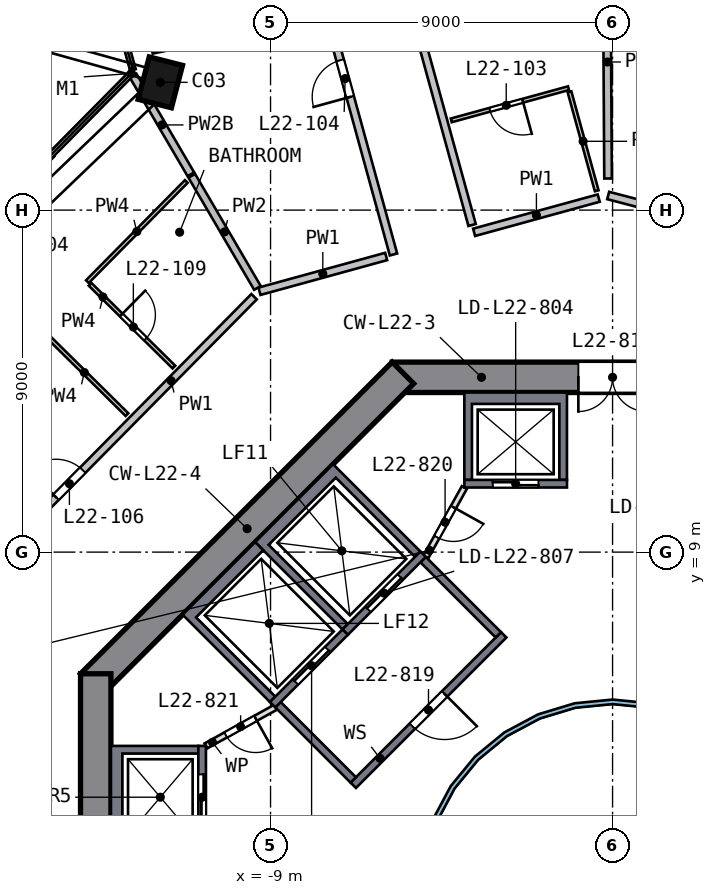
"""IFC4 building model, lengths in metres.
Left out: names, types, materials, properties, quantities, classifications, styles, units other than length and angle.
Written with IfcOpenShell. Run it as: python <this file> out.ifc"""

import sys

from ifc_helpers import new_model, si_unit, direction, frame, frame_2d, origin, origin_2d, place, context, subcontext, project, spatial, polyline, rectangle, outline, extrude, element, fill, save


model = new_model("IFC4")
c1 = context("Model", 3, precision=1e-05, world=origin(), true_north=direction((0.0, 1.0)))
c2 = subcontext(c1, "Body", "Model", "MODEL_VIEW")
j1 = project(units=[si_unit("LENGTHUNIT", "METRE"), si_unit("PLANEANGLEUNIT", "RADIAN")], contexts=[c1])
p1 = place(None, origin())
s1 = spatial("IfcSite", under=j1, at=p1, CompositionType="ELEMENT")
p2 = place(p1, origin())
s2 = spatial("IfcBuilding", under=s1, at=p2, CompositionType="ELEMENT")
p3 = place(p2, frame((0.0, 0.0, 96.5)))
s3 = spatial("IfcBuildingStorey", under=s2, at=p3, CompositionType="ELEMENT", Elevation=96.5)
p4 = place(p3, frame((-11.777, 21.431, 0.0), z_axis=(-0.10140473, -0.056859624, 0.993219041), x_axis=(0.245212496, 0.966134351, 0.080344556)))
e1 = element("IfcColumn", 1, at=p4, inside=s3, PredefinedType="COLUMN", context=c2, shape_type="SweptSolid", body=[
    extrude(rectangle(XDim=1.15, YDim=0.9, at=origin_2d()), origin(), (0.0, 0.0, 1.0), 3.212),
])
p5 = place(p3, frame((5.799, 13.6, 0.0), z_axis=(0.0, 0.0, 1.0), x_axis=(-1.0, 0.0, 0.0)))
e2 = element("IfcWall", 2, at=p5, inside=s3, PredefinedType="SHEAR", context=c2, shape_type="SweptSolid", body=[
    extrude(rectangle(XDim=11.598, YDim=0.8, at=frame_2d((5.799, 0.0))), origin(), (0.0, 0.0, 1.0), 3.5),
])
p6 = place(p5, frame((4.899, 0.0, 0.0)))
e3 = element("IfcOpeningElement", 3, at=p6, cuts=e2, PredefinedType="OPENING", context=c2, shape_type="SweptSolid", body=[
    extrude(rectangle(XDim=1.8, YDim=2.1, at=frame_2d((0.9, 1.05))), frame((0.0, 0.41, 0.0), z_axis=(0.0, -1.0, 0.0), x_axis=(1.0, 0.0, 0.0)), (0.0, 0.0, 1.0), 0.82),
])
p7 = place(p3, frame((-5.516, 13.717, 0.0), z_axis=(0.0, 0.0, 1.0), x_axis=(-0.707106781, -0.707106781, 0.0)))
e4 = element("IfcWall", 4, at=p7, inside=s3, PredefinedType="SHEAR", context=c2, shape_type="SweptSolid", body=[
    extrude(rectangle(XDim=11.598, YDim=0.8, at=frame_2d((5.799, 0.0))), origin(), (0.0, 0.0, 1.0), 3.5),
])
p8 = place(p3, frame((-13.6, 5.799, 0.0), z_axis=(0.0, 0.0, 1.0), x_axis=(0.0, -1.0, 0.0)))
e5 = element("IfcWall", 5, at=p8, inside=s3, PredefinedType="SHEAR", context=c2, shape_type="SweptSolid", body=[
    extrude(rectangle(XDim=11.598, YDim=0.8, at=frame_2d((5.799, 0.0))), origin(), (0.0, 0.0, 1.0), 3.5),
])
p9 = place(p8, frame((4.899, 0.0, 0.0)))
e6 = element("IfcOpeningElement", 6, at=p9, cuts=e5, PredefinedType="OPENING", context=c2, shape_type="SweptSolid", body=[
    extrude(rectangle(XDim=1.8, YDim=2.1, at=frame_2d((0.9, 1.05))), frame((0.0, 0.41, 0.0), z_axis=(0.0, -1.0, 0.0), x_axis=(1.0, 0.0, 0.0)), (0.0, 0.0, 1.0), 0.82),
])
p10 = place(p3, frame((-14.766, 19.465, 0.0), z_axis=(0.0, 0.0, 1.0), x_axis=(-0.702631444, -0.711553971, 0.0)))
e7 = element("IfcWall", 7, at=p10, inside=s3, PredefinedType="SOLIDWALL", context=c2, shape_type="SweptSolid", body=[
    extrude(rectangle(XDim=3.475, YDim=0.15, at=frame_2d((1.738, 0.0))), origin(), (0.0, 0.0, 1.0), 2.425),
])
p11 = place(p10, frame((0.4, 0.0, 0.0)))
e8 = element("IfcOpeningElement", 8, at=p11, cuts=e7, PredefinedType="OPENING", context=c2, shape_type="SweptSolid", body=[
    extrude(rectangle(XDim=2.4, YDim=2.4, at=frame_2d((1.2, 1.2))), frame((0.0, 0.085, 0.0), z_axis=(0.0, -1.0, 0.0), x_axis=(1.0, 0.0, 0.0)), (0.0, 0.0, 1.0), 0.17),
])
p12 = place(p3, origin())
e9 = element("IfcWall", 9, at=p12, inside=s3, PredefinedType="SOLIDWALL", context=c2, shape_type="SweptSolid", body=[
    extrude(outline(polyline([(-3.9, 10.9), (-3.9, 13.2), (-1.2, 13.2), (-1.2, 10.9), (-1.4, 10.9), (-1.4, 12.9), (-3.7, 12.9), (-3.7, 10.9), (-3.9, 10.9)])), origin(), (0.0, 0.0, 1.0), 3.19),
])
p13 = place(p3, frame((-1.2, 10.8, 0.0), z_axis=(0.0, 0.0, 1.0), x_axis=(-1.0, 0.0, 0.0)))
e10 = element("IfcWall", 10, at=p13, inside=s3, PredefinedType="SOLIDWALL", context=c2, shape_type="SweptSolid", body=[
    extrude(rectangle(XDim=2.7, YDim=0.2, at=frame_2d((1.35, 0.0))), origin(), (0.0, 0.0, 1.0), 3.19),
])
p14 = place(p13, frame((0.75, 0.0, 0.0)))
e11 = element("IfcOpeningElement", 11, at=p14, cuts=e10, PredefinedType="OPENING", context=c2, shape_type="SweptSolid", body=[
    extrude(rectangle(XDim=1.2, YDim=2.1, at=frame_2d((0.6, 1.05))), frame((0.0, 0.11, 0.0), z_axis=(0.0, -1.0, 0.0), x_axis=(1.0, 0.0, 0.0)), (0.0, 0.0, 1.0), 0.22),
])
p15 = place(p3, origin())
e12 = element("IfcWall", 12, at=p15, inside=s3, PredefinedType="SOLIDWALL", context=c2, shape_type="SweptSolid", body=[
    extrude(outline(polyline([(-13.2, 3.9), (-10.9, 3.9), (-10.9, 3.7), (-12.9, 3.7), (-12.9, 1.4), (-10.9, 1.4), (-10.9, 1.2), (-13.2, 1.2), (-13.2, 3.9)])), origin(), (0.0, 0.0, 1.0), 3.19),
])
p16 = place(p3, frame((-10.8, 1.2, 0.0), z_axis=(0.0, 0.0, 1.0), x_axis=(0.0, 1.0, 0.0)))
e13 = element("IfcWall", 13, at=p16, inside=s3, PredefinedType="SOLIDWALL", context=c2, shape_type="SweptSolid", body=[
    extrude(rectangle(XDim=2.7, YDim=0.2, at=frame_2d((1.35, 0.0))), origin(), (0.0, 0.0, 1.0), 3.19),
])
p17 = place(p16, frame((0.75, 0.0, 0.0)))
e14 = element("IfcOpeningElement", 14, at=p17, cuts=e13, PredefinedType="OPENING", context=c2, shape_type="SweptSolid", body=[
    extrude(rectangle(XDim=1.2, YDim=2.1, at=frame_2d((0.6, 1.05))), frame((0.0, 0.11, 0.0), z_axis=(0.0, -1.0, 0.0), x_axis=(1.0, 0.0, 0.0)), (0.0, 0.0, 1.0), 0.22),
])
p18 = place(p3, origin())
e15 = element("IfcWall", 15, at=p18, inside=s3, PredefinedType="SOLIDWALL", context=c2, shape_type="SweptSolid", body=[
    extrude(outline(polyline([(-9.405, 9.263), (-7.354, 11.314), (-5.056, 9.016), (-5.197, 8.874), (-7.283, 10.96), (-9.051, 9.192), (-6.965, 7.106), (-7.106, 6.965), (-9.405, 9.263)])), origin(), (0.0, 0.0, 1.0), 3.19),
])
p19 = place(p3, frame((-4.985, 8.945, 0.0), z_axis=(0.0, 0.0, 1.0), x_axis=(-0.707106781, -0.707106781, 0.0)))
e16 = element("IfcWall", 16, at=p19, inside=s3, PredefinedType="SOLIDWALL", context=c2, shape_type="SweptSolid", body=[
    extrude(rectangle(XDim=2.9, YDim=0.2, at=frame_2d((1.45, 0.0))), origin(), (0.0, 0.0, 1.0), 3.19),
])
p20 = place(p19, frame((0.85, 0.0, 0.0)))
e17 = element("IfcOpeningElement", 17, at=p20, cuts=e16, PredefinedType="OPENING", context=c2, shape_type="SweptSolid", body=[
    extrude(rectangle(XDim=1.2, YDim=2.1, at=frame_2d((0.6, 1.05))), frame((0.0, 0.11, 0.0), z_axis=(0.0, -1.0, 0.0), x_axis=(1.0, 0.0, 0.0)), (0.0, 0.0, 1.0), 0.22),
])
p21 = place(p3, origin())
e18 = element("IfcWall", 18, at=p21, inside=s3, PredefinedType="SOLIDWALL", context=c2, shape_type="SweptSolid", body=[
    extrude(outline(polyline([(-11.314, 7.354), (-9.405, 9.263), (-9.192, 9.051), (-10.96, 7.283), (-8.874, 5.197), (-9.016, 5.056), (-11.314, 7.354)])), origin(), (0.0, 0.0, 1.0), 3.19),
])
p22 = place(p3, frame((-7.036, 6.894, 0.0), z_axis=(0.0, 0.0, 1.0), x_axis=(-0.707106781, -0.707106781, 0.0)))
e19 = element("IfcWall", 19, at=p22, inside=s3, PredefinedType="SOLIDWALL", context=c2, shape_type="SweptSolid", body=[
    extrude(rectangle(XDim=2.7, YDim=0.2, at=frame_2d((1.35, 0.0))), origin(), (0.0, 0.0, 1.0), 3.19),
])
p23 = place(p22, frame((0.65, 0.0, 0.0)))
e20 = element("IfcOpeningElement", 20, at=p23, cuts=e19, PredefinedType="OPENING", context=c2, shape_type="SweptSolid", body=[
    extrude(rectangle(XDim=1.2, YDim=2.1, at=frame_2d((0.6, 1.05))), frame((0.0, 0.11, 0.0), z_axis=(0.0, -1.0, 0.0), x_axis=(1.0, 0.0, 0.0)), (0.0, 0.0, 1.0), 0.22),
])
p24 = place(p3, frame((-2.864, 6.823, 0.0), z_axis=(0.0, 0.0, 1.0), x_axis=(-0.707106781, -0.707106781, 0.0)))
e21 = element("IfcWall", 21, at=p24, inside=s3, PredefinedType="SOLIDWALL", context=c2, shape_type="SweptSolid", body=[
    extrude(rectangle(XDim=5.6, YDim=0.2, at=frame_2d((2.8, 0.0))), origin(), (0.0, 0.0, 1.0), 3.19),
])
p25 = place(p24, frame((2.2, 0.0, 0.0)))
e22 = element("IfcOpeningElement", 22, at=p25, cuts=e21, PredefinedType="OPENING", context=c2, shape_type="SweptSolid", body=[
    extrude(rectangle(XDim=1.2, YDim=2.1, at=frame_2d((0.6, 1.05))), frame((0.0, 0.11, 0.0), z_axis=(0.0, -1.0, 0.0), x_axis=(1.0, 0.0, 0.0)), (0.0, 0.0, 1.0), 0.22),
])
for number, where, z_axis, x_axis in (
    (23, (-3.005, 6.823, 0.0), (0.0, 0.0, 1.0), (-0.707, 0.707, 0.0)),
    (24, (-6.823, 3.005, 0.0), (0.0, 0.0, 1.0), (-0.707, 0.707, 0.0)),
):
    element("IfcWall", number, at=place(p3, frame(where, z_axis=z_axis, x_axis=x_axis)), inside=s3, PredefinedType="SOLIDWALL", context=c2, shape_type="SweptSolid", body=[
        extrude(rectangle(XDim=2.8, YDim=0.2, at=frame_2d((1.4, 0.0))), origin(), (0.0, 0.0, 1.0), 3.19),
    ])
p26 = place(p3, frame((-3.9, 10.7, 0.0), z_axis=(0.0, 0.0, 1.0), x_axis=(-0.485692555, -0.874129705, 0.0)))
e25 = element("IfcWall", 25, at=p26, inside=s3, PredefinedType="PARTITIONING", context=c2, shape_type="SweptSolid", body=[
    extrude(rectangle(XDim=2.089, YDim=0.15, at=frame_2d((1.044, 0.0))), origin(), (0.0, 0.0, 1.0), 3.19),
])
p27 = place(p26, frame((0.594, 0.0, 0.0)))
e26 = element("IfcOpeningElement", 26, at=p27, cuts=e25, PredefinedType="OPENING", context=c2, shape_type="SweptSolid", body=[
    extrude(rectangle(XDim=0.9, YDim=2.1, at=frame_2d((0.45, 1.05))), frame((0.0, 0.085, 0.0), z_axis=(0.0, -1.0, 0.0), x_axis=(1.0, 0.0, 0.0)), (0.0, 0.0, 1.0), 0.17),
])
p28 = place(p3, frame((-8.874, 4.914, 0.0), z_axis=(0.0, 0.0, 1.0), x_axis=(-0.874129705, -0.485692555, 0.0)))
e27 = element("IfcWall", 27, at=p28, inside=s3, PredefinedType="PARTITIONING", context=c2, shape_type="SweptSolid", body=[
    extrude(rectangle(XDim=2.089, YDim=0.15, at=frame_2d((1.044, 0.0))), origin(), (0.0, 0.0, 1.0), 3.19),
])
p29 = place(p28, frame((0.594, 0.0, 0.0)))
e28 = element("IfcOpeningElement", 28, at=p29, cuts=e27, PredefinedType="OPENING", context=c2, shape_type="SweptSolid", body=[
    extrude(rectangle(XDim=0.9, YDim=2.1, at=frame_2d((0.45, 1.05))), frame((0.0, 0.085, 0.0), z_axis=(0.0, -1.0, 0.0), x_axis=(1.0, 0.0, 0.0)), (0.0, 0.0, 1.0), 0.17),
])
p30 = place(p3, origin())
e29 = element("IfcWall", 29, at=p30, inside=s3, PredefinedType="SOLIDWALL", context=c2, shape_type="SweptSolid", body=[
    extrude(outline(polyline([(5.021, -0.999), (4.73, -1.959), (4.257, -2.844), (3.62, -3.62), (2.844, -4.257), (1.959, -4.73), (0.999, -5.021), (0.0, -5.12), (-0.999, -5.021), (-1.959, -4.73), (-2.844, -4.257), (-3.62, -3.62), (-4.257, -2.844), (-4.73, -1.959), (-5.021, -0.999), (-5.12, 0.0), (-5.021, 0.999), (-4.73, 1.959), (-4.257, 2.844), (-3.62, 3.62), (-2.844, 4.257), (-1.959, 4.73), (-0.999, 5.021), (0.0, 5.12), (0.999, 5.021), (1.959, 4.73), (2.844, 4.257), (3.62, 3.62), (4.257, 2.844), (4.73, 1.959), (5.021, 0.999), (5.12, 0.0), (5.021, -0.999)]), holes=[polyline([(4.904, 0.976), (4.619, 1.913), (4.157, 2.778), (3.535, 3.535), (2.778, 4.157), (1.913, 4.619), (0.976, 4.904), (0.0, 5.0), (-0.976, 4.904), (-1.913, 4.619), (-2.778, 4.157), (-3.535, 3.535), (-4.157, 2.778), (-4.619, 1.913), (-4.904, 0.976), (-5.0, 0.0), (-4.904, -0.976), (-4.619, -1.913), (-4.157, -2.778), (-3.535, -3.535), (-2.778, -4.157), (-1.913, -4.619), (-0.976, -4.904), (0.0, -5.0), (0.976, -4.904), (1.913, -4.619), (2.778, -4.157), (3.535, -3.535), (4.157, -2.778), (4.619, -1.913), (4.904, -0.976), (5.0, 0.0), (4.904, 0.976)])]), origin(), (0.0, 0.0, 1.0), 3.19),
])
p31 = place(p3, frame((-15.979, 9.092, 0.0), z_axis=(0.0, 0.0, 1.0), x_axis=(0.702650979, 0.71153468, 0.0)))
e30 = element("IfcWall", 30, at=p31, inside=s3, PredefinedType="SOLIDWALL", context=c2, shape_type="SweptSolid", body=[
    extrude(rectangle(XDim=9.316, YDim=0.2, at=frame_2d((4.658, 0.0))), origin(), (0.0, 0.0, 1.0), 3.19),
])
p32 = place(p31, frame((1.9, 0.0, 0.0)))
e31 = element("IfcOpeningElement", 31, at=p32, cuts=e30, PredefinedType="OPENING", context=c2, shape_type="SweptSolid", body=[
    extrude(rectangle(XDim=1.0, YDim=2.1, at=frame_2d((0.5, 1.05))), frame((0.0, 0.11, 0.0), z_axis=(0.0, -1.0, 0.0), x_axis=(1.0, 0.0, 0.0)), (0.0, 0.0, 1.0), 0.22),
])
p33 = place(p3, frame((-5.958, 16.78, 0.0), z_axis=(0.0, 0.0, 1.0), x_axis=(-0.964263577, -0.264944813, 0.0)))
e32 = element("IfcWall", 32, at=p33, inside=s3, PredefinedType="SOLIDWALL", context=c2, shape_type="SweptSolid", body=[
    extrude(rectangle(XDim=3.458, YDim=0.2, at=frame_2d((1.729, 0.0))), origin(), (0.0, 0.0, 1.0), 3.19),
])
p34 = place(p3, frame((-5.765, 16.833, 0.0), z_axis=(0.0, 0.0, 1.0), x_axis=(-0.264881321, 0.96428102, 0.0)))
e33 = element("IfcWall", 33, at=p34, inside=s3, PredefinedType="SOLIDWALL", context=c2, shape_type="SweptSolid", body=[
    extrude(rectangle(XDim=12.271, YDim=0.2, at=frame_2d((6.135, 0.0))), origin(), (0.0, 0.0, 1.0), 3.19),
])
p35 = place(p34, frame((4.3, 0.0, 0.0)))
e34 = element("IfcOpeningElement", 34, at=p35, cuts=e33, PredefinedType="OPENING", context=c2, shape_type="SweptSolid", body=[
    extrude(rectangle(XDim=1.0, YDim=2.1, at=frame_2d((0.5, 1.05))), frame((0.0, 0.11, 0.0), z_axis=(0.0, -1.0, 0.0), x_axis=(1.0, 0.0, 0.0)), (0.0, 0.0, 1.0), 0.22),
])
p36 = place(p3, frame((-3.696, 17.608, 0.0), z_axis=(0.0, 0.0, 1.0), x_axis=(-0.264881463, 0.964280981, 0.0)))
e35 = element("IfcWall", 35, at=p36, inside=s3, PredefinedType="SOLIDWALL", context=c2, shape_type="SweptSolid", body=[
    extrude(rectangle(XDim=12.071, YDim=0.2, at=frame_2d((6.035, 0.0))), origin(), (0.0, 0.0, 1.0), 3.19),
])
p37 = place(p3, frame((-0.365, 18.316, 0.0), z_axis=(0.0, 0.0, 1.0), x_axis=(-0.964283368, -0.264872773, 0.0)))
e36 = element("IfcWall", 36, at=p37, inside=s3, PredefinedType="SOLIDWALL", context=c2, shape_type="SweptSolid", body=[
    extrude(rectangle(XDim=3.4, YDim=0.2, at=frame_2d((1.7, 0.0))), origin(), (0.0, 0.0, 1.0), 3.19),
])
p38 = place(p3, frame((9.092, 15.979, 0.0), z_axis=(0.0, 0.0, 1.0), x_axis=(-0.967528939, 0.252760265, 0.0)))
e37 = element("IfcWall", 37, at=p38, inside=s3, PredefinedType="SOLIDWALL", context=c2, shape_type="SweptSolid", body=[
    extrude(rectangle(XDim=9.516, YDim=0.2, at=frame_2d((4.758, 0.0))), origin(), (0.0, 0.0, 1.0), 3.19),
])
p39 = place(p3, frame((-11.096, 18.942, 0.0), z_axis=(0.0, 0.0, 1.0), x_axis=(-0.505382416, 0.862895482, 0.0)))
e38 = element("IfcWall", 38, at=p39, inside=s3, PredefinedType="SOLIDWALL", context=c2, shape_type="SweptSolid", body=[
    extrude(rectangle(XDim=3.011, YDim=0.2, at=frame_2d((1.506, 0.0))), origin(), (0.0, 0.0, 1.0), 2.69),
])
p40 = place(p3, frame((-9.344, 15.953, 0.0), z_axis=(0.0, 0.0, 1.0), x_axis=(-0.505424382, 0.862870903, 0.0)))
e39 = element("IfcWall", 39, at=p40, inside=s3, PredefinedType="SOLIDWALL", context=c2, shape_type="SweptSolid", body=[
    extrude(rectangle(XDim=3.418, YDim=0.2, at=frame_2d((1.709, 0.0))), origin(), (0.0, 0.0, 1.0), 3.19),
])
p41 = place(p3, frame((-0.157, 24.964, 0.0), z_axis=(0.0, 0.0, 1.0), x_axis=(0.006290436, -0.999980215, 0.0)))
e40 = element("IfcWall", 40, at=p41, inside=s3, PredefinedType="SOLIDWALL", context=c2, shape_type="SweptSolid", body=[
    extrude(rectangle(XDim=6.132, YDim=0.2, at=frame_2d((3.066, 0.0))), origin(), (0.0, 0.0, 1.0), 3.19),
])
p42 = place(p3, frame((-17.154, 16.94, 0.0), z_axis=(0.0, 0.0, 1.0), x_axis=(0.711519329, -0.702666525, 0.0)))
e41 = element("IfcWall", 41, at=p42, inside=s3, PredefinedType="PARTITIONING", context=c2, shape_type="SweptSolid", body=[
    extrude(rectangle(XDim=6.15, YDim=0.1, at=frame_2d((3.075, 0.0))), origin(), (0.0, 0.0, 1.0), 3.19),
])
p43 = place(p42, frame((1.8, 0.0, 0.0)))
e42 = element("IfcOpeningElement", 42, at=p43, cuts=e41, PredefinedType="OPENING", context=c2, shape_type="SweptSolid", body=[
    extrude(rectangle(XDim=1.0, YDim=2.1, at=frame_2d((0.5, 1.05))), frame((0.0, 0.06, 0.0), z_axis=(0.0, -1.0, 0.0), x_axis=(1.0, 0.0, 0.0)), (0.0, 0.0, 1.0), 0.12),
])
p44 = place(p3, frame((-13.748, 16.048, 0.0), z_axis=(0.0, 0.0, 1.0), x_axis=(0.711542382, -0.70264318, 0.0)))
e43 = element("IfcWall", 43, at=p44, inside=s3, PredefinedType="PARTITIONING", context=c2, shape_type="SweptSolid", body=[
    extrude(rectangle(XDim=3.1, YDim=0.1, at=frame_2d((1.55, 0.0))), origin(), (0.0, 0.0, 1.0), 3.19),
])
p45 = place(p44, frame((1.15, 0.0, 0.0)))
e44 = element("IfcOpeningElement", 44, at=p45, cuts=e43, PredefinedType="OPENING", context=c2, shape_type="SweptSolid", body=[
    extrude(rectangle(XDim=0.9, YDim=2.1, at=frame_2d((0.45, 1.05))), frame((0.0, 0.06, 0.0), z_axis=(0.0, -1.0, 0.0), x_axis=(1.0, 0.0, 0.0)), (0.0, 0.0, 1.0), 0.12),
])
p46 = place(p3, frame((-11.217, 18.753, 0.0), z_axis=(0.0, 0.0, 1.0), x_axis=(-0.702643586, -0.711541981, 0.0)))
e45 = element("IfcWall", 45, at=p46, inside=s3, PredefinedType="PARTITIONING", context=c2, shape_type="SweptSolid", body=[
    extrude(rectangle(XDim=3.704, YDim=0.1, at=frame_2d((1.852, 0.0))), origin(), (0.0, 0.0, 1.0), 3.19),
])
p47 = place(p3, frame((-1.159, 21.209, 0.0), z_axis=(0.0, 0.0, 1.0), x_axis=(-0.964283368, -0.264872773, 0.0)))
e46 = element("IfcWall", 46, at=p47, inside=s3, PredefinedType="PARTITIONING", context=c2, shape_type="SweptSolid", body=[
    extrude(rectangle(XDim=3.2, YDim=0.1, at=frame_2d((1.6, 0.0))), origin(), (0.0, 0.0, 1.0), 3.19),
])
p48 = place(p47, frame((1.25, 0.0, 0.0)))
e47 = element("IfcOpeningElement", 47, at=p48, cuts=e46, PredefinedType="OPENING", context=c2, shape_type="SweptSolid", body=[
    extrude(rectangle(XDim=0.9, YDim=2.1, at=frame_2d((0.45, 1.05))), frame((0.0, 0.06, 0.0), z_axis=(0.0, -1.0, 0.0), x_axis=(1.0, 0.0, 0.0)), (0.0, 0.0, 1.0), 0.12),
])
p49 = place(p3, frame((-0.417, 18.509, 0.0), z_axis=(0.0, 0.0, 1.0), x_axis=(-0.264937907, 0.964265475, 0.0)))
e48 = element("IfcWall", 48, at=p49, inside=s3, PredefinedType="PARTITIONING", context=c2, shape_type="SweptSolid", body=[
    extrude(rectangle(XDim=2.7, YDim=0.1, at=frame_2d((1.35, 0.0))), origin(), (0.0, 0.0, 1.0), 3.19),
])
p50 = place(p14, origin())
e49 = element("IfcDoor", 49, at=p50, inside=s3, OperationType="DOUBLE_DOOR_SLIDING", PredefinedType="DOOR", context=c2, shape_type="SweptSolid", body=[
    extrude(rectangle(XDim=1.2, YDim=2.1, at=frame_2d((0.6, 1.05))), frame((0.0, 0.025, 0.0), z_axis=(0.0, -1.0, 0.0), x_axis=(1.0, 0.0, 0.0)), (0.0, 0.0, 1.0), 0.05),
])
fill(e11, e49)
p51 = place(p17, origin())
e50 = element("IfcDoor", 50, at=p51, inside=s3, OperationType="DOUBLE_DOOR_SLIDING", PredefinedType="DOOR", context=c2, shape_type="SweptSolid", body=[
    extrude(rectangle(XDim=1.2, YDim=2.1, at=frame_2d((0.6, 1.05))), frame((0.0, 0.025, 0.0), z_axis=(0.0, -1.0, 0.0), x_axis=(1.0, 0.0, 0.0)), (0.0, 0.0, 1.0), 0.05),
])
fill(e14, e50)
p52 = place(p20, origin())
e51 = element("IfcDoor", 51, at=p52, inside=s3, OperationType="DOUBLE_DOOR_SLIDING", PredefinedType="DOOR", context=c2, shape_type="SweptSolid", body=[
    extrude(rectangle(XDim=1.2, YDim=2.1, at=frame_2d((0.6, 1.05))), frame((0.0, 0.025, 0.0), z_axis=(0.0, -1.0, 0.0), x_axis=(1.0, 0.0, 0.0)), (0.0, 0.0, 1.0), 0.05),
])
fill(e17, e51)
p53 = place(p23, origin())
e52 = element("IfcDoor", 52, at=p53, inside=s3, OperationType="DOUBLE_DOOR_SLIDING", PredefinedType="DOOR", context=c2, shape_type="SweptSolid", body=[
    extrude(rectangle(XDim=1.2, YDim=2.1, at=frame_2d((0.6, 1.05))), frame((0.0, 0.025, 0.0), z_axis=(0.0, -1.0, 0.0), x_axis=(1.0, 0.0, 0.0)), (0.0, 0.0, 1.0), 0.05),
])
fill(e20, e52)
p54 = place(p6, origin())
e53 = element("IfcDoor", 53, at=p54, inside=s3, OperationType="DOUBLE_DOOR_SINGLE_SWING", PredefinedType="DOOR", context=c2, shape_type="SweptSolid", body=[
    extrude(rectangle(XDim=1.8, YDim=2.1, at=frame_2d((0.9, 1.05))), frame((0.0, 0.025, 0.0), z_axis=(0.0, -1.0, 0.0), x_axis=(1.0, 0.0, 0.0)), (0.0, 0.0, 1.0), 0.05),
])
fill(e3, e53)
p55 = place(p25, origin())
e54 = element("IfcDoor", 54, at=p55, inside=s3, OperationType="SINGLE_SWING_LEFT", PredefinedType="DOOR", context=c2, shape_type="SweptSolid", body=[
    extrude(rectangle(XDim=1.2, YDim=2.1, at=frame_2d((0.6, 1.05))), frame((0.0, 0.025, 0.0), z_axis=(0.0, -1.0, 0.0), x_axis=(1.0, 0.0, 0.0)), (0.0, 0.0, 1.0), 0.05),
])
fill(e22, e54)
p56 = place(p27, origin())
e55 = element("IfcDoor", 55, at=p56, inside=s3, OperationType="SINGLE_SWING_LEFT", PredefinedType="DOOR", context=c2, shape_type="SweptSolid", body=[
    extrude(rectangle(XDim=0.9, YDim=2.1, at=frame_2d((0.45, 1.05))), frame((0.0, 0.025, 0.0), z_axis=(0.0, -1.0, 0.0), x_axis=(1.0, 0.0, 0.0)), (0.0, 0.0, 1.0), 0.05),
])
fill(e26, e55)
p57 = place(p29, origin())
e56 = element("IfcDoor", 56, at=p57, inside=s3, OperationType="SINGLE_SWING_LEFT", PredefinedType="DOOR", context=c2, shape_type="SweptSolid", body=[
    extrude(rectangle(XDim=0.9, YDim=2.1, at=frame_2d((0.45, 1.05))), frame((0.0, 0.025, 0.0), z_axis=(0.0, -1.0, 0.0), x_axis=(1.0, 0.0, 0.0)), (0.0, 0.0, 1.0), 0.05),
])
fill(e28, e56)
p58 = place(p48, origin())
e57 = element("IfcDoor", 57, at=p58, inside=s3, OperationType="SINGLE_SWING_LEFT", PredefinedType="DOOR", context=c2, shape_type="SweptSolid", body=[
    extrude(rectangle(XDim=0.9, YDim=2.1, at=frame_2d((0.45, 1.05))), frame((0.0, 0.025, 0.0), z_axis=(0.0, -1.0, 0.0), x_axis=(1.0, 0.0, 0.0)), (0.0, 0.0, 1.0), 0.05),
])
fill(e47, e57)
p59 = place(p35, origin())
e58 = element("IfcDoor", 58, at=p59, inside=s3, OperationType="SINGLE_SWING_LEFT", PredefinedType="DOOR", context=c2, shape_type="SweptSolid", body=[
    extrude(rectangle(XDim=1.0, YDim=2.1, at=frame_2d((0.5, 1.05))), frame((0.0, 0.025, 0.0), z_axis=(0.0, -1.0, 0.0), x_axis=(1.0, 0.0, 0.0)), (0.0, 0.0, 1.0), 0.05),
])
fill(e34, e58)
p60 = place(p32, origin())
e59 = element("IfcDoor", 59, at=p60, inside=s3, OperationType="SINGLE_SWING_LEFT", PredefinedType="DOOR", context=c2, shape_type="SweptSolid", body=[
    extrude(rectangle(XDim=1.0, YDim=2.1, at=frame_2d((0.5, 1.05))), frame((0.0, 0.025, 0.0), z_axis=(0.0, -1.0, 0.0), x_axis=(1.0, 0.0, 0.0)), (0.0, 0.0, 1.0), 0.05),
])
fill(e31, e59)
p61 = place(p45, origin())
e60 = element("IfcDoor", 60, at=p61, inside=s3, OperationType="SINGLE_SWING_LEFT", PredefinedType="DOOR", context=c2, shape_type="SweptSolid", body=[
    extrude(rectangle(XDim=0.9, YDim=2.1, at=frame_2d((0.45, 1.05))), frame((0.0, 0.025, 0.0), z_axis=(0.0, -1.0, 0.0), x_axis=(1.0, 0.0, 0.0)), (0.0, 0.0, 1.0), 0.05),
])
fill(e44, e60)
save(model, sys.argv[1])
